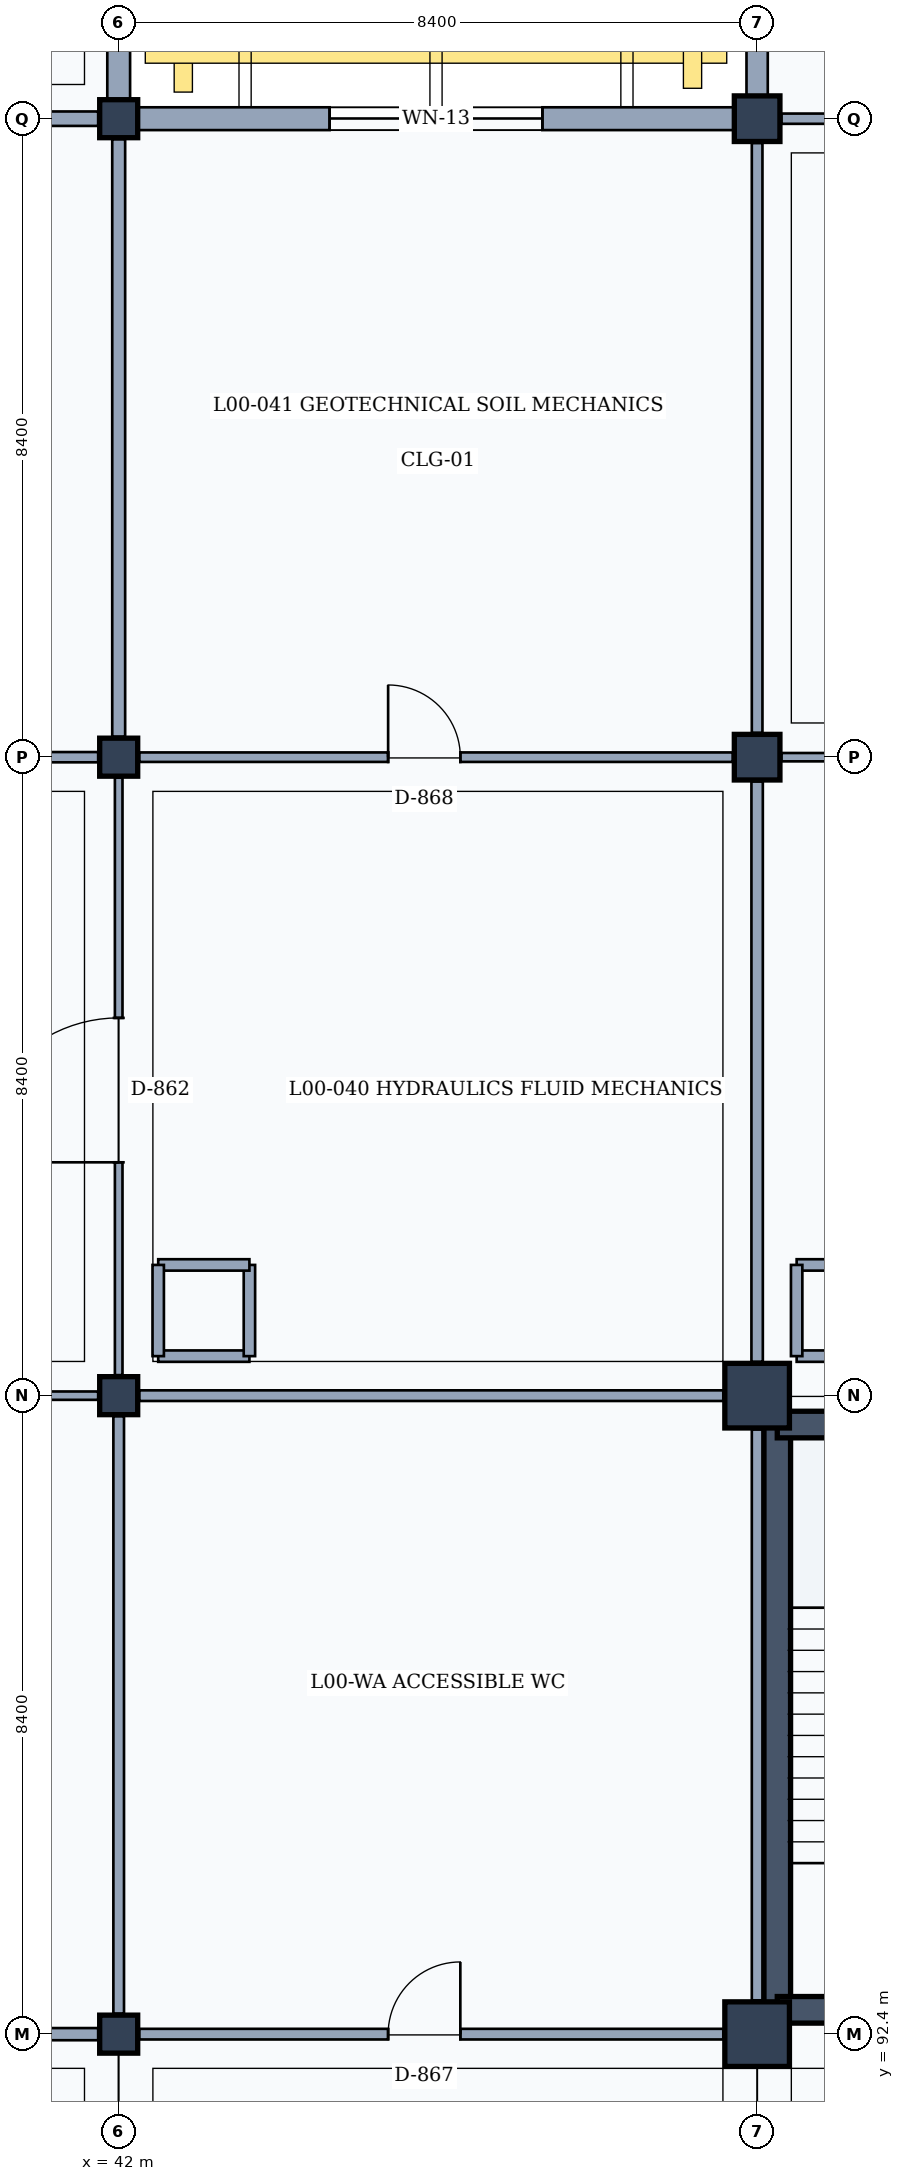
"""IFC4 building model, lengths in metres.
Left out: names, types, materials, properties, quantities, classifications, styles, units other than length and angle.
Written with IfcOpenShell. Run it as: python <this file> out.ifc"""

import sys

from ifc_helpers import new_model, si_unit, direction, frame, frame_2d, origin, origin_2d, place, context, subcontext, project, spatial, rectangle, extrude, element, fill, save


model = new_model("IFC4")
c1 = context("Model", 3, precision=1e-05, world=origin(), true_north=direction((0.0, 1.0)))
c2 = subcontext(c1, "Body", "Model", "MODEL_VIEW")
j1 = project(units=[si_unit("LENGTHUNIT", "METRE"), si_unit("PLANEANGLEUNIT", "RADIAN")], contexts=[c1])
p1 = place(None, origin())
s1 = spatial("IfcSite", under=j1, at=p1, CompositionType="ELEMENT")
p2 = place(p1, origin())
s2 = spatial("IfcBuilding", under=s1, at=p2, CompositionType="ELEMENT")
p3 = place(p2, origin())
s3 = spatial("IfcBuildingStorey", under=s2, at=p3, CompositionType="ELEMENT", Elevation=0.0)
for number, where, z_axis, x_axis in (
    (1, (42.0, 92.4, 0.0), (0.0, 0.0, 1.0), (1.0, 0.0, 0.0)),
    (2, (42.0, 100.8, 0.0), (0.0, 0.0, 1.0), (1.0, 0.0, 0.0)),
    (3, (42.0, 109.2, 0.0), (0.0, 0.0, 1.0), (1.0, 0.0, 0.0)),
    (4, (42.0, 117.6, 0.0), (0.0, 0.0, 1.0), (1.0, 0.0, 0.0)),
):
    element("IfcColumn", number, at=place(p3, frame(where, z_axis=z_axis, x_axis=x_axis)), inside=s3, PredefinedType="COLUMN", context=c2, shape_type="SweptSolid", body=[
        extrude(rectangle(XDim=0.5, YDim=0.5, at=origin_2d()), origin(), (0.0, 0.0, 1.0), 4.8),
    ])
for number, where, z_axis, x_axis in (
    (5, (50.4, 92.4, 0.0), (0.0, 0.0, 1.0), (1.0, 0.0, 0.0)),
    (6, (50.4, 100.8, 0.0), (0.0, 0.0, 1.0), (1.0, 0.0, 0.0)),
):
    element("IfcColumn", number, at=place(p3, frame(where, z_axis=z_axis, x_axis=x_axis)), inside=s3, PredefinedType="COLUMN", context=c2, shape_type="SweptSolid", body=[
        extrude(rectangle(XDim=0.85, YDim=0.85, at=origin_2d()), origin(), (0.0, 0.0, 1.0), 4.8),
    ])
for number, where, z_axis, x_axis in (
    (7, (50.4, 109.2, 0.0), (0.0, 0.0, 1.0), (1.0, 0.0, 0.0)),
    (8, (50.4, 117.6, 0.0), (0.0, 0.0, 1.0), (1.0, 0.0, 0.0)),
):
    element("IfcColumn", number, at=place(p3, frame(where, z_axis=z_axis, x_axis=x_axis)), inside=s3, PredefinedType="COLUMN", context=c2, shape_type="SweptSolid", body=[
        extrude(rectangle(XDim=0.6, YDim=0.6, at=origin_2d()), origin(), (0.0, 0.0, 1.0), 4.8),
    ])
p4 = place(p3, frame((42.0, 125.75, 0.0), z_axis=(0.0, 0.0, 1.0), x_axis=(0.0, -1.0, 0.0)))
e9 = element("IfcWall", 9, at=p4, inside=s3, PredefinedType="SOLIDWALL", context=c2, shape_type="SweptSolid", body=[
    extrude(rectangle(XDim=7.9, YDim=0.3, at=frame_2d((3.95, 0.0))), origin(), (0.0, 0.0, 1.0), 3.96),
])
p5 = place(p4, frame((3.05, 0.0, 0.95)))
e10 = element("IfcOpeningElement", 10, at=p5, cuts=e9, PredefinedType="OPENING", context=c2, shape_type="SweptSolid", body=[
    extrude(rectangle(XDim=1.8, YDim=1.5, at=frame_2d((0.9, 0.75))), frame((0.0, 0.16, 0.0), z_axis=(0.0, -1.0, 0.0), x_axis=(1.0, 0.0, 0.0)), (0.0, 0.0, 1.0), 0.32),
])
p6 = place(p3, frame((42.25, 117.6, 0.0), z_axis=(0.0, 0.0, 1.0), x_axis=(1.0, 0.0, 0.0)))
e11 = element("IfcWall", 11, at=p6, inside=s3, PredefinedType="SOLIDWALL", context=c2, shape_type="SweptSolid", body=[
    extrude(rectangle(XDim=7.85, YDim=0.3, at=frame_2d((3.925, 0.0))), origin(), (0.0, 0.0, 1.0), 3.96),
])
p7 = place(p6, frame((2.525, 0.0, 0.95)))
e12 = element("IfcOpeningElement", 12, at=p7, cuts=e11, PredefinedType="OPENING", context=c2, shape_type="SweptSolid", body=[
    extrude(rectangle(XDim=2.8, YDim=1.65, at=frame_2d((1.4, 0.825))), frame((0.0, 0.16, 0.0), z_axis=(0.0, -1.0, 0.0), x_axis=(1.0, 0.0, 0.0)), (0.0, 0.0, 1.0), 0.32),
])
p8 = place(p3, frame((50.4, 117.9, 0.0), z_axis=(0.0, 0.0, 1.0), x_axis=(0.0, 1.0, 0.0)))
e13 = element("IfcWall", 13, at=p8, inside=s3, PredefinedType="SOLIDWALL", context=c2, shape_type="SweptSolid", body=[
    extrude(rectangle(XDim=7.8, YDim=0.28, at=frame_2d((3.9, 0.0))), origin(), (0.0, 0.0, 1.0), 3.96),
])
p9 = place(p8, frame((3.3, 0.0, 0.95)))
e14 = element("IfcOpeningElement", 14, at=p9, cuts=e13, PredefinedType="OPENING", context=c2, shape_type="SweptSolid", body=[
    extrude(rectangle(XDim=1.2, YDim=1.8, at=frame_2d((0.6, 0.9))), frame((0.0, 0.15, 0.0), z_axis=(0.0, -1.0, 0.0), x_axis=(1.0, 0.0, 0.0)), (0.0, 0.0, 1.0), 0.3),
])
p10 = place(p3, frame((50.665, 92.65, 0.0), z_axis=(0.0, 0.0, 1.0), x_axis=(0.0, 1.0, 0.0)))
e15 = element("IfcWall", 15, at=p10, inside=s3, PredefinedType="SHEAR", context=c2, shape_type="SweptSolid", body=[
    extrude(rectangle(XDim=7.94, YDim=0.35, at=frame_2d((3.97, 0.0))), origin(), (0.0, 0.0, 1.0), 4.54),
])
p11 = place(p3, frame((50.665, 100.42, 0.0), z_axis=(0.0, 0.0, 1.0), x_axis=(1.0, 0.0, 0.0)))
e16 = element("IfcWall", 16, at=p11, inside=s3, PredefinedType="SHEAR", context=c2, shape_type="SweptSolid", body=[
    extrude(rectangle(XDim=7.875, YDim=0.35, at=frame_2d((3.938, 0.0))), origin(), (0.0, 0.0, 1.0), 4.54),
])
p12 = place(p3, frame((58.54, 92.72, 0.0), z_axis=(0.0, 0.0, 1.0), x_axis=(-1.0, 0.0, 0.0)))
e17 = element("IfcWall", 17, at=p12, inside=s3, PredefinedType="SHEAR", context=c2, shape_type="SweptSolid", body=[
    extrude(rectangle(XDim=7.875, YDim=0.35, at=frame_2d((3.938, 0.0))), origin(), (0.0, 0.0, 1.0), 4.54),
])
p13 = place(p12, frame((2.1, 0.0, 0.0)))
e18 = element("IfcOpeningElement", 18, at=p13, cuts=e17, PredefinedType="OPENING", context=c2, shape_type="SweptSolid", body=[
    extrude(rectangle(XDim=1.1, YDim=2.15, at=frame_2d((0.55, 1.075))), frame((0.0, 0.185, 0.0), z_axis=(0.0, -1.0, 0.0), x_axis=(1.0, 0.0, 0.0)), (0.0, 0.0, 1.0), 0.37),
])
for number, where, z_axis, x_axis in (
    (19, (42.52, 101.32, 0.0), (0.0, 0.0, 1.0), (1.0, 0.0, 0.0)),
    (20, (43.72, 101.32, 0.0), (0.0, 0.0, 1.0), (0.0, 1.0, 0.0)),
    (21, (43.72, 102.52, 0.0), (0.0, 0.0, 1.0), (-1.0, 0.0, 0.0)),
    (22, (42.52, 102.52, 0.0), (0.0, 0.0, 1.0), (0.0, -1.0, 0.0)),
):
    element("IfcWall", number, at=place(p3, frame(where, z_axis=z_axis, x_axis=x_axis)), inside=s3, PredefinedType="PARTITIONING", context=c2, shape_type="SweptSolid", body=[
        extrude(rectangle(XDim=1.2, YDim=0.15, at=frame_2d((0.6, 0.0))), origin(), (0.0, 0.0, 1.0), 4.55),
    ])
for number, where, z_axis, x_axis in (
    (23, (50.92, 101.32, 0.0), (0.0, 0.0, 1.0), (1.0, 0.0, 0.0)),
    (24, (52.12, 102.52, 0.0), (0.0, 0.0, 1.0), (-1.0, 0.0, 0.0)),
):
    element("IfcWall", number, at=place(p3, frame(where, z_axis=z_axis, x_axis=x_axis)), inside=s3, PredefinedType="PARTITIONING", context=c2, shape_type="SweptSolid", body=[
        extrude(rectangle(XDim=1.2, YDim=0.15, at=frame_2d((0.6, 0.0))), origin(), (0.0, 0.0, 1.0), 4.54),
    ])
p14 = place(p3, frame((50.92, 102.52, 0.0), z_axis=(0.0, 0.0, 1.0), x_axis=(0.0, -1.0, 0.0)))
e25 = element("IfcWall", 25, at=p14, inside=s3, PredefinedType="PARTITIONING", context=c2, shape_type="SweptSolid", body=[
    extrude(rectangle(XDim=1.2, YDim=0.15, at=frame_2d((0.6, 0.0))), origin(), (0.0, 0.0, 1.0), 4.54),
])
p15 = place(p3, frame((33.97, 92.4, 0.0), z_axis=(0.0, 0.0, 1.0), x_axis=(1.0, 0.0, 0.0)))
e26 = element("IfcWall", 26, at=p15, inside=s3, PredefinedType="PARTITIONING", context=c2, shape_type="SweptSolid", body=[
    extrude(rectangle(XDim=7.76, YDim=0.16, at=frame_2d((3.88, 0.0))), origin(), (0.0, 0.0, 1.0), 3.87),
])
p16 = place(p15, frame((2.9, 0.0, 0.0)))
e27 = element("IfcOpeningElement", 27, at=p16, cuts=e26, PredefinedType="OPENING", context=c2, shape_type="SweptSolid", body=[
    extrude(rectangle(XDim=1.7, YDim=2.3, at=frame_2d((0.85, 1.15))), frame((0.0, 0.09, 0.0), z_axis=(0.0, -1.0, 0.0), x_axis=(1.0, 0.0, 0.0)), (0.0, 0.0, 1.0), 0.18),
])
p17 = place(p3, frame((42.0, 92.67, 0.0), z_axis=(0.0, 0.0, 1.0), x_axis=(0.0, 1.0, 0.0)))
e28 = element("IfcWall", 28, at=p17, inside=s3, PredefinedType="PARTITIONING", context=c2, shape_type="SweptSolid", body=[
    extrude(rectangle(XDim=7.86, YDim=0.14, at=frame_2d((3.93, 0.0))), origin(), (0.0, 0.0, 1.0), 3.92),
])
p18 = place(p3, frame((33.97, 100.8, 0.0), z_axis=(0.0, 0.0, 1.0), x_axis=(1.0, 0.0, 0.0)))
e29 = element("IfcWall", 29, at=p18, inside=s3, PredefinedType="PARTITIONING", context=c2, shape_type="SweptSolid", body=[
    extrude(rectangle(XDim=7.76, YDim=0.11, at=frame_2d((3.88, 0.0))), origin(), (0.0, 0.0, 1.0), 3.87),
])
p19 = place(p3, frame((42.0, 101.07, 0.0), z_axis=(0.0, 0.0, 1.0), x_axis=(0.0, 1.0, 0.0)))
e30 = element("IfcWall", 30, at=p19, inside=s3, PredefinedType="MOVABLE", context=c2, shape_type="SweptSolid", body=[
    extrude(rectangle(XDim=7.86, YDim=0.1, at=frame_2d((3.93, 0.0))), origin(), (0.0, 0.0, 1.0), 3.92),
])
p20 = place(p19, frame((2.8, 0.0, 0.0)))
e31 = element("IfcOpeningElement", 31, at=p20, cuts=e30, PredefinedType="OPENING", context=c2, shape_type="SweptSolid", body=[
    extrude(rectangle(XDim=1.9, YDim=2.4, at=frame_2d((0.95, 1.2))), frame((0.0, 0.06, 0.0), z_axis=(0.0, -1.0, 0.0), x_axis=(1.0, 0.0, 0.0)), (0.0, 0.0, 1.0), 0.12),
])
p21 = place(p3, frame((33.97, 109.2, 0.0), z_axis=(0.0, 0.0, 1.0), x_axis=(1.0, 0.0, 0.0)))
e32 = element("IfcWall", 32, at=p21, inside=s3, PredefinedType="PARTITIONING", context=c2, shape_type="SweptSolid", body=[
    extrude(rectangle(XDim=7.76, YDim=0.135, at=frame_2d((3.88, 0.0))), origin(), (0.0, 0.0, 1.0), 3.87),
])
p22 = place(p21, frame((3.3, 0.0, 0.0)))
e33 = element("IfcOpeningElement", 33, at=p22, cuts=e32, PredefinedType="OPENING", context=c2, shape_type="SweptSolid", body=[
    extrude(rectangle(XDim=0.9, YDim=2.1, at=frame_2d((0.45, 1.05))), frame((0.0, 0.077, 0.0), z_axis=(0.0, -1.0, 0.0), x_axis=(1.0, 0.0, 0.0)), (0.0, 0.0, 1.0), 0.155),
])
p23 = place(p3, frame((42.0, 109.47, 0.0), z_axis=(0.0, 0.0, 1.0), x_axis=(0.0, 1.0, 0.0)))
e34 = element("IfcWall", 34, at=p23, inside=s3, PredefinedType="PARTITIONING", context=c2, shape_type="SweptSolid", body=[
    extrude(rectangle(XDim=7.86, YDim=0.17, at=frame_2d((3.93, 0.0))), origin(), (0.0, 0.0, 1.0), 3.92),
])
p24 = place(p3, frame((33.97, 117.6, 0.0), z_axis=(0.0, 0.0, 1.0), x_axis=(1.0, 0.0, 0.0)))
e35 = element("IfcWall", 35, at=p24, inside=s3, PredefinedType="PARTITIONING", context=c2, shape_type="SweptSolid", body=[
    extrude(rectangle(XDim=7.76, YDim=0.19, at=frame_2d((3.88, 0.0))), origin(), (0.0, 0.0, 1.0), 3.87),
])
p25 = place(p24, frame((3.125, 0.0, 0.0)))
e36 = element("IfcOpeningElement", 36, at=p25, cuts=e35, PredefinedType="OPENING", context=c2, shape_type="SweptSolid", body=[
    extrude(rectangle(XDim=1.25, YDim=2.3, at=frame_2d((0.625, 1.15))), frame((0.0, 0.105, 0.0), z_axis=(0.0, -1.0, 0.0), x_axis=(1.0, 0.0, 0.0)), (0.0, 0.0, 1.0), 0.21),
])
p26 = place(p3, frame((42.27, 92.4, 0.0), z_axis=(0.0, 0.0, 1.0), x_axis=(1.0, 0.0, 0.0)))
e37 = element("IfcWall", 37, at=p26, inside=s3, PredefinedType="PARTITIONING", context=c2, shape_type="SweptSolid", body=[
    extrude(rectangle(XDim=7.685, YDim=0.14, at=frame_2d((3.843, 0.0))), origin(), (0.0, 0.0, 1.0), 3.86),
])
p27 = place(p26, frame((3.275, 0.0, 0.0)))
e38 = element("IfcOpeningElement", 38, at=p27, cuts=e37, PredefinedType="OPENING", context=c2, shape_type="SweptSolid", body=[
    extrude(rectangle(XDim=0.95, YDim=2.15, at=frame_2d((0.475, 1.075))), frame((0.0, 0.08, 0.0), z_axis=(0.0, -1.0, 0.0), x_axis=(1.0, 0.0, 0.0)), (0.0, 0.0, 1.0), 0.16),
])
p28 = place(p3, frame((50.4, 92.845, 0.0), z_axis=(0.0, 0.0, 1.0), x_axis=(0.0, 1.0, 0.0)))
e39 = element("IfcWall", 39, at=p28, inside=s3, PredefinedType="PARTITIONING", context=c2, shape_type="SweptSolid", body=[
    extrude(rectangle(XDim=7.51, YDim=0.14, at=frame_2d((3.755, 0.0))), origin(), (0.0, 0.0, 1.0), 3.92),
])
p29 = place(p3, frame((42.27, 100.8, 0.0), z_axis=(0.0, 0.0, 1.0), x_axis=(1.0, 0.0, 0.0)))
e40 = element("IfcWall", 40, at=p29, inside=s3, PredefinedType="PARTITIONING", context=c2, shape_type="SweptSolid", body=[
    extrude(rectangle(XDim=7.685, YDim=0.14, at=frame_2d((3.843, 0.0))), origin(), (0.0, 0.0, 1.0), 3.86),
])
p30 = place(p3, frame((50.4, 101.245, 0.0), z_axis=(0.0, 0.0, 1.0), x_axis=(0.0, 1.0, 0.0)))
e41 = element("IfcWall", 41, at=p30, inside=s3, PredefinedType="PARTITIONING", context=c2, shape_type="SweptSolid", body=[
    extrude(rectangle(XDim=7.635, YDim=0.15, at=frame_2d((3.817, 0.0))), origin(), (0.0, 0.0, 1.0), 3.92),
])
p31 = place(p3, frame((42.27, 109.2, 0.0), z_axis=(0.0, 0.0, 1.0), x_axis=(1.0, 0.0, 0.0)))
e42 = element("IfcWall", 42, at=p31, inside=s3, PredefinedType="PARTITIONING", context=c2, shape_type="SweptSolid", body=[
    extrude(rectangle(XDim=7.81, YDim=0.125, at=frame_2d((3.905, 0.0))), origin(), (0.0, 0.0, 1.0), 3.86),
])
p32 = place(p31, frame((3.275, 0.0, 0.0)))
e43 = element("IfcOpeningElement", 43, at=p32, cuts=e42, PredefinedType="OPENING", context=c2, shape_type="SweptSolid", body=[
    extrude(rectangle(XDim=0.95, YDim=2.15, at=frame_2d((0.475, 1.075))), frame((0.0, 0.073, 0.0), z_axis=(0.0, -1.0, 0.0), x_axis=(1.0, 0.0, 0.0)), (0.0, 0.0, 1.0), 0.145),
])
p33 = place(p3, frame((50.4, 109.52, 0.0), z_axis=(0.0, 0.0, 1.0), x_axis=(0.0, 1.0, 0.0)))
e44 = element("IfcWall", 44, at=p33, inside=s3, PredefinedType="PARTITIONING", context=c2, shape_type="SweptSolid", body=[
    extrude(rectangle(XDim=7.76, YDim=0.14, at=frame_2d((3.88, 0.0))), origin(), (0.0, 0.0, 1.0), 3.92),
])
p34 = place(p3, frame((50.72, 109.2, 0.0), z_axis=(0.0, 0.0, 1.0), x_axis=(1.0, 0.0, 0.0)))
e45 = element("IfcWall", 45, at=p34, inside=s3, PredefinedType="PARTITIONING", context=c2, shape_type="SweptSolid", body=[
    extrude(rectangle(XDim=7.76, YDim=0.11, at=frame_2d((3.88, 0.0))), origin(), (0.0, 0.0, 1.0), 3.92),
])
p35 = place(p34, frame((3.05, 0.0, 0.0)))
e46 = element("IfcOpeningElement", 46, at=p35, cuts=e45, PredefinedType="OPENING", context=c2, shape_type="SweptSolid", body=[
    extrude(rectangle(XDim=1.4, YDim=2.25, at=frame_2d((0.7, 1.125))), frame((0.0, 0.065, 0.0), z_axis=(0.0, -1.0, 0.0), x_axis=(1.0, 0.0, 0.0)), (0.0, 0.0, 1.0), 0.13),
])
p36 = place(p3, frame((50.72, 117.6, 0.0), z_axis=(0.0, 0.0, 1.0), x_axis=(1.0, 0.0, 0.0)))
e47 = element("IfcWall", 47, at=p36, inside=s3, PredefinedType="PARTITIONING", context=c2, shape_type="SweptSolid", body=[
    extrude(rectangle(XDim=7.76, YDim=0.135, at=frame_2d((3.88, 0.0))), origin(), (0.0, 0.0, 1.0), 3.92),
])
p37 = place(p36, frame((3.0, 0.0, 0.0)))
e48 = element("IfcOpeningElement", 48, at=p37, cuts=e47, PredefinedType="OPENING", context=c2, shape_type="SweptSolid", body=[
    extrude(rectangle(XDim=1.5, YDim=2.3, at=frame_2d((0.75, 1.15))), frame((0.0, 0.077, 0.0), z_axis=(0.0, -1.0, 0.0), x_axis=(1.0, 0.0, 0.0)), (0.0, 0.0, 1.0), 0.155),
])
p38 = place(p7, origin())
e49 = element("IfcWindow", 49, at=p38, inside=s3, PartitioningType="SINGLE_PANEL", PredefinedType="WINDOW", context=c2, shape_type="SweptSolid", body=[
    extrude(rectangle(XDim=2.8, YDim=1.65, at=frame_2d((1.4, 0.825))), frame((0.0, 0.03, 0.0), z_axis=(0.0, -1.0, 0.0), x_axis=(1.0, 0.0, 0.0)), (0.0, 0.0, 1.0), 0.06),
])
fill(e12, e49)
p39 = place(p20, origin())
e50 = element("IfcDoor", 50, at=p39, inside=s3, OperationType="SINGLE_SWING_LEFT", PredefinedType="DOOR", context=c2, shape_type="SweptSolid", body=[
    extrude(rectangle(XDim=1.9, YDim=2.4, at=frame_2d((0.95, 1.2))), frame((0.0, 0.025, 0.0), z_axis=(0.0, -1.0, 0.0), x_axis=(1.0, 0.0, 0.0)), (0.0, 0.0, 1.0), 0.05),
])
fill(e31, e50)
p40 = place(p27, origin())
e51 = element("IfcDoor", 51, at=p40, inside=s3, OperationType="SINGLE_SWING_RIGHT", PredefinedType="DOOR", context=c2, shape_type="SweptSolid", body=[
    extrude(rectangle(XDim=0.95, YDim=2.15, at=frame_2d((0.475, 1.075))), frame((0.0, 0.025, 0.0), z_axis=(0.0, -1.0, 0.0), x_axis=(1.0, 0.0, 0.0)), (0.0, 0.0, 1.0), 0.05),
])
fill(e38, e51)
p41 = place(p32, origin())
e52 = element("IfcDoor", 52, at=p41, inside=s3, OperationType="SINGLE_SWING_LEFT", PredefinedType="DOOR", context=c2, shape_type="SweptSolid", body=[
    extrude(rectangle(XDim=0.95, YDim=2.15, at=frame_2d((0.475, 1.075))), frame((0.0, 0.025, 0.0), z_axis=(0.0, -1.0, 0.0), x_axis=(1.0, 0.0, 0.0)), (0.0, 0.0, 1.0), 0.05),
])
fill(e43, e52)
save(model, sys.argv[1])
